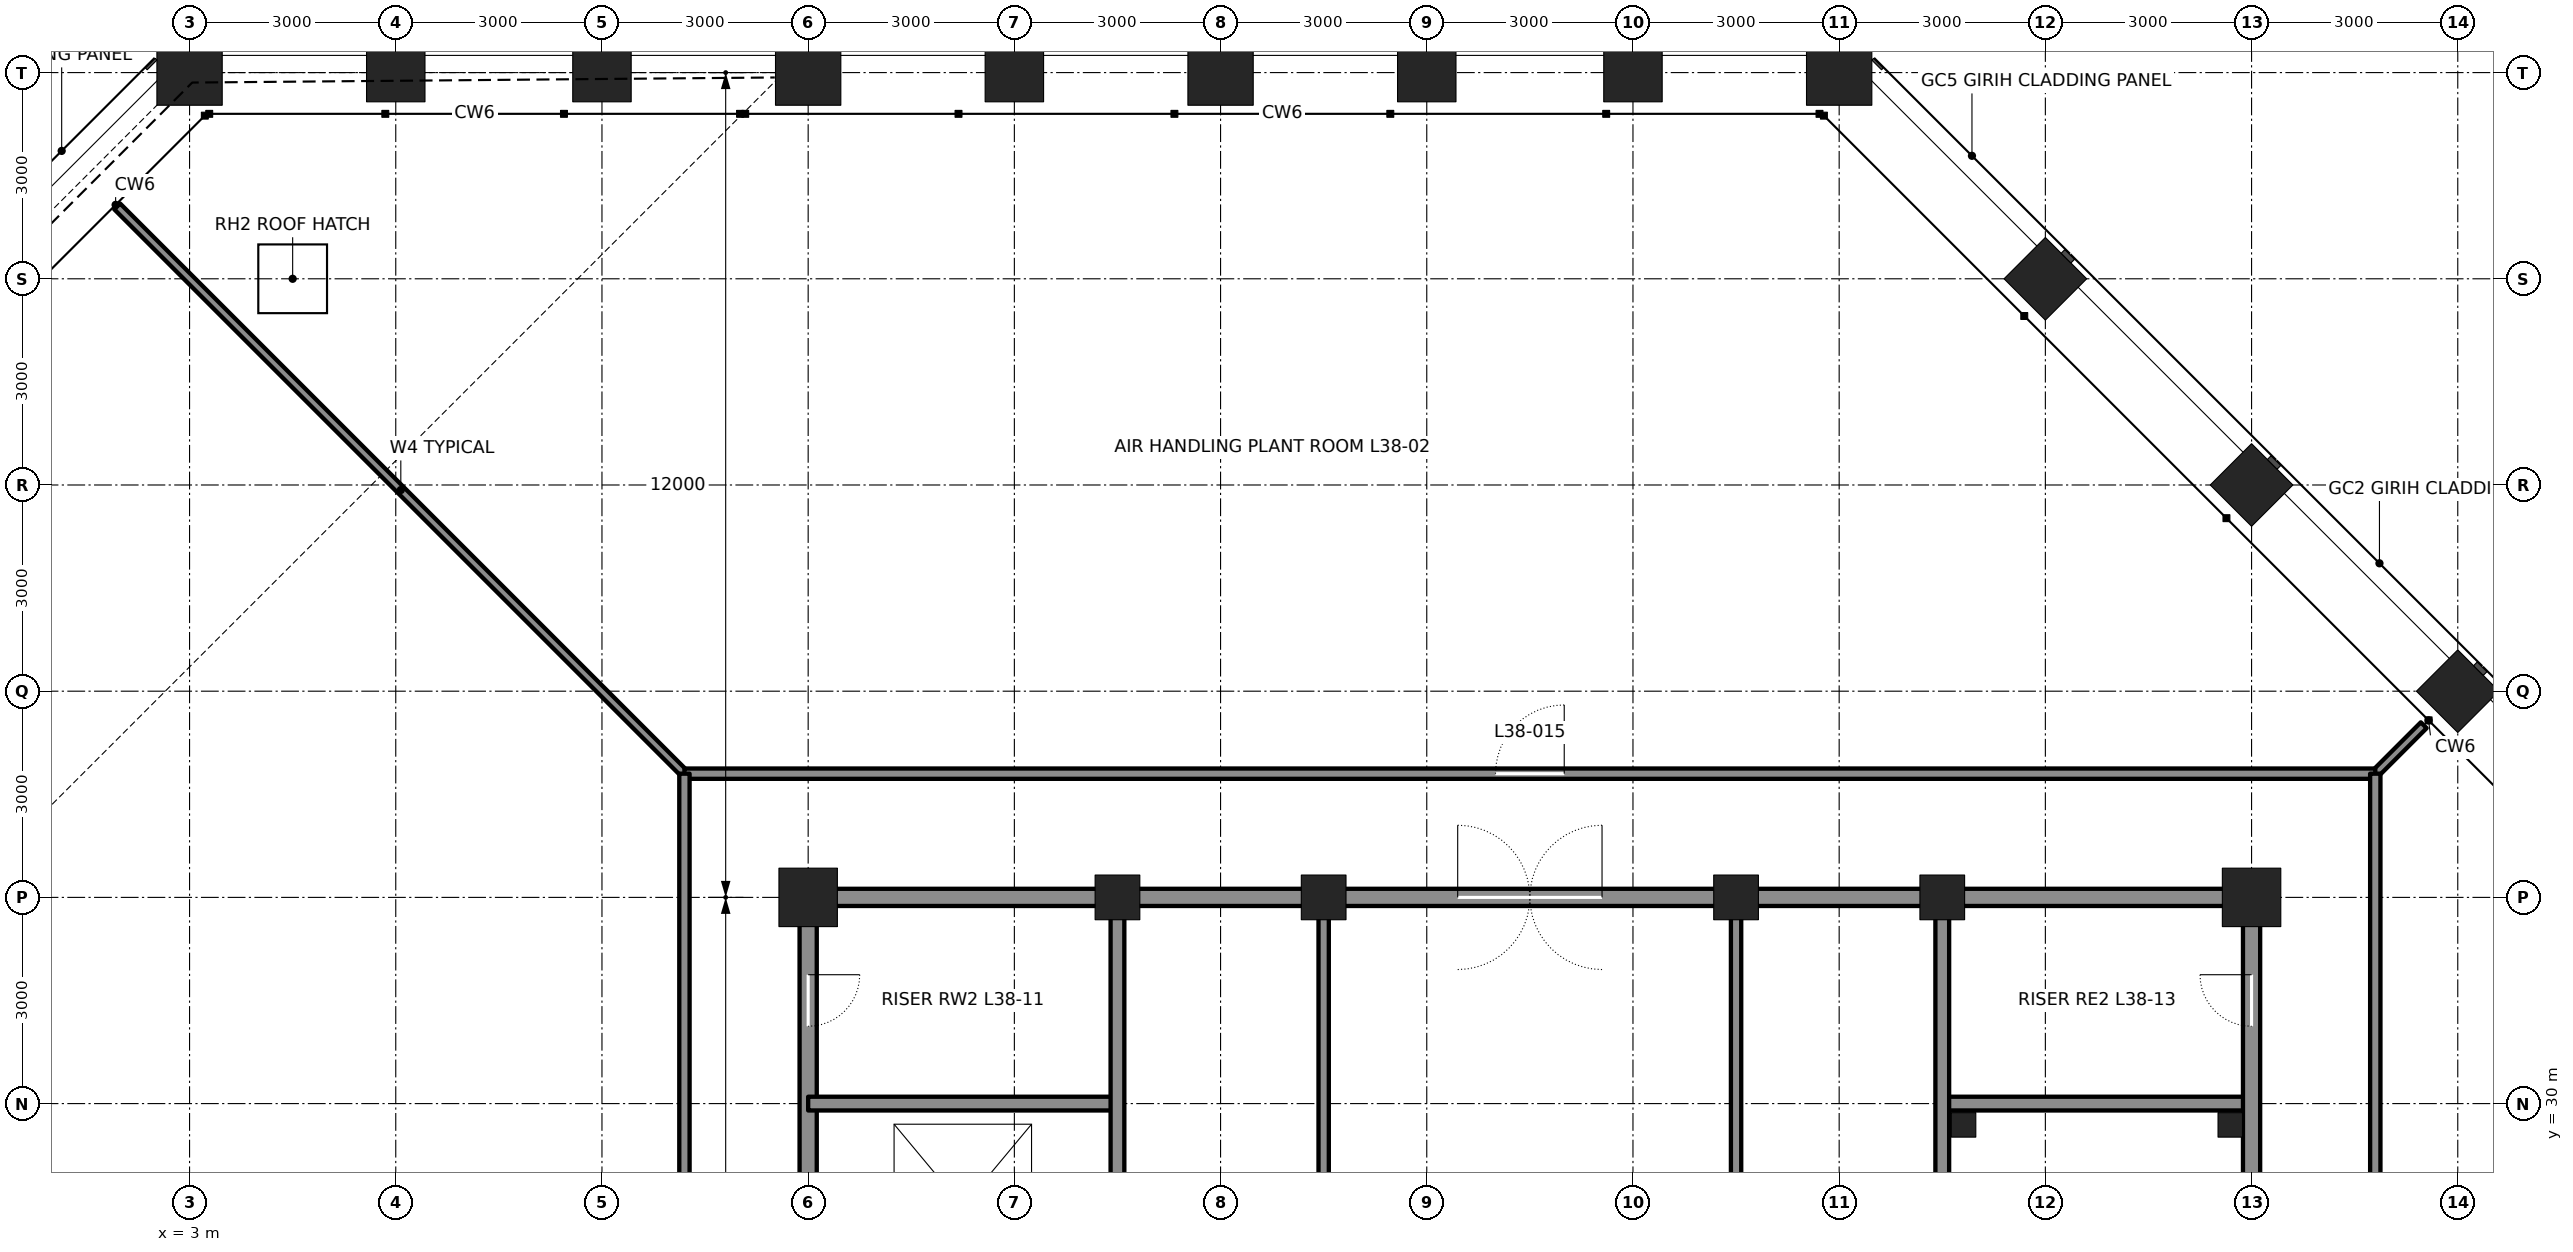
"""IFC4 building model, lengths in metres.
Left out: names, types, materials, properties, quantities, classifications, styles, units other than length and angle.
Written with IfcOpenShell. Run it as: python <this file> out.ifc"""

import sys

from ifc_helpers import new_model, si_unit, direction, frame, frame_2d, origin, origin_2d, place, context, subcontext, project, spatial, rectangle, hollow_rectangle, extrude, element, fill, save


model = new_model("IFC4")
c1 = context("Model", 3, precision=1e-05, world=origin(), true_north=direction((0.0, 1.0)))
c2 = subcontext(c1, "Body", "Model", "MODEL_VIEW")
j1 = project(units=[si_unit("LENGTHUNIT", "METRE"), si_unit("PLANEANGLEUNIT", "RADIAN")], contexts=[c1])
p1 = place(None, origin())
s1 = spatial("IfcSite", under=j1, at=p1, CompositionType="ELEMENT")
p2 = place(p1, origin())
s2 = spatial("IfcBuilding", under=s1, at=p2, CompositionType="ELEMENT")
p3 = place(p2, frame((0.0, 0.0, 174.0)))
s3 = spatial("IfcBuildingStorey", under=s2, at=p3, CompositionType="ELEMENT", Elevation=174.0)
for number, where, z_axis, x_axis in (
    (1, (36.0, 36.0, 0.0), (0.0, 0.0, 1.0), (0.707, 0.707, 0.0)),
    (2, (33.0, 39.0, 0.0), (0.0, 0.0, 1.0), (0.707, 0.707, 0.0)),
    (3, (30.0, 42.0, 0.0), (0.0, 0.0, 1.0), (0.707, 0.707, 0.0)),
):
    element("IfcColumn", number, at=place(p3, frame(where, z_axis=z_axis, x_axis=x_axis)), inside=s3, PredefinedType="COLUMN", context=c2, shape_type="SweptSolid", body=[
        extrude(hollow_rectangle(XDim=0.85, YDim=0.85, WallThickness=0.085, at=origin_2d()), origin(), (0.0, 0.0, 1.0), 6.0),
    ])
p4 = place(p3, frame((27.0, 45.0, 0.0), z_axis=(0.0, 0.0, 1.0), x_axis=(0.0, 1.0, 0.0)))
e4 = element("IfcColumn", 4, at=p4, inside=s3, PredefinedType="COLUMN", context=c2, shape_type="SweptSolid", body=[
    extrude(hollow_rectangle(XDim=0.95, YDim=0.95, WallThickness=0.095, at=origin_2d()), origin(), (0.0, 0.0, 1.0), 6.0),
])
for number, where, z_axis, x_axis in (
    (5, (24.0, 45.0, 0.0), (0.0, 0.0, 1.0), (0.0, 1.0, 0.0)),
    (6, (21.0, 45.0, 0.0), (0.0, 0.0, 1.0), (0.0, 1.0, 0.0)),
):
    element("IfcColumn", number, at=place(p3, frame(where, z_axis=z_axis, x_axis=x_axis)), inside=s3, PredefinedType="COLUMN", context=c2, shape_type="SweptSolid", body=[
        extrude(hollow_rectangle(XDim=0.85, YDim=0.85, WallThickness=0.085, at=origin_2d()), origin(), (0.0, 0.0, 1.0), 6.0),
    ])
p5 = place(p3, frame((18.0, 45.0, 0.0), z_axis=(0.0, 0.0, 1.0), x_axis=(0.0, 1.0, 0.0)))
e7 = element("IfcColumn", 7, at=p5, inside=s3, PredefinedType="COLUMN", context=c2, shape_type="SweptSolid", body=[
    extrude(hollow_rectangle(XDim=0.95, YDim=0.95, WallThickness=0.11, at=origin_2d()), origin(), (0.0, 0.0, 1.0), 6.0),
])
p6 = place(p3, frame((15.0, 45.0, 0.0), z_axis=(0.0, 0.0, 1.0), x_axis=(0.0, 1.0, 0.0)))
e8 = element("IfcColumn", 8, at=p6, inside=s3, PredefinedType="COLUMN", context=c2, shape_type="SweptSolid", body=[
    extrude(hollow_rectangle(XDim=0.85, YDim=0.85, WallThickness=0.085, at=origin_2d()), origin(), (0.0, 0.0, 1.0), 6.0),
])
p7 = place(p3, frame((12.0, 45.0, 0.0), z_axis=(0.0, 0.0, 1.0), x_axis=(0.0, 1.0, 0.0)))
e9 = element("IfcColumn", 9, at=p7, inside=s3, PredefinedType="COLUMN", context=c2, shape_type="SweptSolid", body=[
    extrude(hollow_rectangle(XDim=0.95, YDim=0.95, WallThickness=0.11, at=origin_2d()), origin(), (0.0, 0.0, 1.0), 6.0),
])
p8 = place(p3, frame((9.0, 45.0, 0.0), z_axis=(0.0, 0.0, 1.0), x_axis=(0.0, 1.0, 0.0)))
e10 = element("IfcColumn", 10, at=p8, inside=s3, PredefinedType="COLUMN", context=c2, shape_type="SweptSolid", body=[
    extrude(hollow_rectangle(XDim=0.85, YDim=0.85, WallThickness=0.085, at=origin_2d()), origin(), (0.0, 0.0, 1.0), 4.149),
])
p9 = place(p3, frame((6.0, 45.0, 0.0), z_axis=(0.0, 0.0, 1.0), x_axis=(0.0, 1.0, 0.0)))
e11 = element("IfcColumn", 11, at=p9, inside=s3, PredefinedType="COLUMN", context=c2, shape_type="SweptSolid", body=[
    extrude(hollow_rectangle(XDim=0.85, YDim=0.85, WallThickness=0.085, at=origin_2d()), origin(), (0.0, 0.0, 1.0), 3.698),
])
p10 = place(p3, frame((3.0, 45.0, 0.0), z_axis=(0.0, 0.0, 1.0), x_axis=(0.0, 1.0, 0.0)))
e12 = element("IfcColumn", 12, at=p10, inside=s3, PredefinedType="COLUMN", context=c2, shape_type="SweptSolid", body=[
    extrude(hollow_rectangle(XDim=0.95, YDim=0.95, WallThickness=0.095, at=origin_2d()), origin(), (0.0, 0.0, 1.0), 3.247),
])
p11 = place(p3, frame((12.0, 33.0, 0.0), z_axis=(0.0, 0.0, 1.0), x_axis=(1.0, 0.0, 0.0)))
e13 = element("IfcColumn", 13, at=p11, inside=s3, PredefinedType="COLUMN", context=c2, shape_type="SweptSolid", body=[
    extrude(hollow_rectangle(XDim=0.85, YDim=0.85, WallThickness=0.085, at=origin_2d()), origin(), (0.0, 0.0, 1.0), 6.0),
])
for number, where, z_axis, x_axis in (
    (14, (16.5, 33.0, 0.0), (0.0, 0.0, 1.0), (1.0, 0.0, 0.0)),
    (15, (19.5, 33.0, 0.0), (0.0, 0.0, 1.0), (1.0, 0.0, 0.0)),
    (16, (25.5, 33.0, 0.0), (0.0, 0.0, 1.0), (1.0, 0.0, 0.0)),
    (17, (28.5, 33.0, 0.0), (0.0, 0.0, 1.0), (1.0, 0.0, 0.0)),
):
    element("IfcColumn", number, at=place(p3, frame(where, z_axis=z_axis, x_axis=x_axis)), inside=s3, PredefinedType="COLUMN", context=c2, shape_type="SweptSolid", body=[
        extrude(hollow_rectangle(XDim=0.65, YDim=0.65, WallThickness=0.065, at=origin_2d()), origin(), (0.0, 0.0, 1.0), 6.0),
    ])
p12 = place(p3, frame((33.0, 33.0, 0.0), z_axis=(0.0, 0.0, 1.0), x_axis=(1.0, 0.0, 0.0)))
e18 = element("IfcColumn", 18, at=p12, inside=s3, PredefinedType="COLUMN", context=c2, shape_type="SweptSolid", body=[
    extrude(hollow_rectangle(XDim=0.85, YDim=0.85, WallThickness=0.085, at=origin_2d()), origin(), (0.0, 0.0, 1.0), 6.0),
])
p13 = place(p3, frame((12.0, 24.25, 0.0), z_axis=(0.0, 0.0, 1.0), x_axis=(0.0, 1.0, 0.0)))
e19 = element("IfcWall", 19, at=p13, inside=s3, PredefinedType="SOLIDWALL", context=c2, shape_type="SweptSolid", body=[
    extrude(rectangle(XDim=8.5, YDim=0.25, at=frame_2d((4.25, 0.0))), origin(), (0.0, 0.0, 1.0), 4.913),
])
p14 = place(p13, frame((0.65, 0.0, 0.0)))
e20 = element("IfcOpeningElement", 20, at=p14, cuts=e19, PredefinedType="OPENING", context=c2, shape_type="SweptSolid", body=[
    extrude(rectangle(XDim=1.2, YDim=2.1, at=frame_2d((0.6, 1.05))), frame((0.0, 0.135, 0.0), z_axis=(0.0, -1.0, 0.0), x_axis=(1.0, 0.0, 0.0)), (0.0, 0.0, 1.0), 0.27),
])
p15 = place(p13, frame((6.875, 0.0, 0.0)))
e21 = element("IfcOpeningElement", 21, at=p15, cuts=e19, PredefinedType="OPENING", context=c2, shape_type="SweptSolid", body=[
    extrude(rectangle(XDim=0.75, YDim=2.1, at=frame_2d((0.375, 1.05))), frame((0.0, 0.135, 0.0), z_axis=(0.0, -1.0, 0.0), x_axis=(1.0, 0.0, 0.0)), (0.0, 0.0, 1.0), 0.27),
])
for number, where, z_axis, x_axis in (
    (22, (12.0, 30.0, 0.0), (0.0, 0.0, 1.0), (1.0, 0.0, 0.0)),
    (23, (28.5, 30.0, 0.0), (0.0, 0.0, 1.0), (1.0, 0.0, 0.0)),
):
    element("IfcWall", number, at=place(p3, frame(where, z_axis=z_axis, x_axis=x_axis)), inside=s3, PredefinedType="SOLIDWALL", context=c2, shape_type="SweptSolid", body=[
        extrude(rectangle(XDim=4.5, YDim=0.2, at=frame_2d((2.25, 0.0))), origin(), (0.0, 0.0, 1.0), 5.84),
    ])
p16 = place(p3, frame((12.25, 33.0, 0.0), z_axis=(0.0, 0.0, 1.0), x_axis=(1.0, 0.0, 0.0)))
e24 = element("IfcWall", 24, at=p16, inside=s3, PredefinedType="SOLIDWALL", context=c2, shape_type="SweptSolid", body=[
    extrude(rectangle(XDim=4.0, YDim=0.25, at=frame_2d((2.0, 0.0))), origin(), (0.0, 0.0, 1.0), 4.981),
])
for number, where, z_axis, x_axis in (
    (25, (16.75, 33.0, 0.0), (0.0, 0.0, 1.0), (1.0, 0.0, 0.0)),
    (26, (25.75, 33.0, 0.0), (0.0, 0.0, 1.0), (1.0, 0.0, 0.0)),
):
    element("IfcWall", number, at=place(p3, frame(where, z_axis=z_axis, x_axis=x_axis)), inside=s3, PredefinedType="SOLIDWALL", context=c2, shape_type="SweptSolid", body=[
        extrude(rectangle(XDim=2.5, YDim=0.25, at=frame_2d((1.25, 0.0))), origin(), (0.0, 0.0, 1.0), 4.981),
    ])
p17 = place(p3, frame((28.75, 33.0, 0.0), z_axis=(0.0, 0.0, 1.0), x_axis=(1.0, 0.0, 0.0)))
e27 = element("IfcWall", 27, at=p17, inside=s3, PredefinedType="SOLIDWALL", context=c2, shape_type="SweptSolid", body=[
    extrude(rectangle(XDim=4.0, YDim=0.25, at=frame_2d((2.0, 0.0))), origin(), (0.0, 0.0, 1.0), 4.981),
])
p18 = place(p3, frame((16.5, 24.25, 0.0), z_axis=(0.0, 0.0, 1.0), x_axis=(0.0, 1.0, 0.0)))
e28 = element("IfcWall", 28, at=p18, inside=s3, PredefinedType="SOLIDWALL", context=c2, shape_type="SweptSolid", body=[
    extrude(rectangle(XDim=8.5, YDim=0.2, at=frame_2d((4.25, 0.0))), origin(), (0.0, 0.0, 1.0), 4.913),
])
for number, where, z_axis, x_axis in (
    (29, (19.5, 27.0, 0.0), (0.0, 0.0, 1.0), (0.0, 1.0, 0.0)),
    (30, (25.5, 27.0, 0.0), (0.0, 0.0, 1.0), (0.0, 1.0, 0.0)),
):
    element("IfcWall", number, at=place(p3, frame(where, z_axis=z_axis, x_axis=x_axis)), inside=s3, PredefinedType="PARTITIONING", context=c2, shape_type="SweptSolid", body=[
        extrude(rectangle(XDim=5.75, YDim=0.15, at=frame_2d((2.875, 0.0))), origin(), (0.0, 0.0, 1.0), 4.865),
    ])
p19 = place(p3, frame((28.5, 24.25, 0.0), z_axis=(0.0, 0.0, 1.0), x_axis=(0.0, 1.0, 0.0)))
e31 = element("IfcWall", 31, at=p19, inside=s3, PredefinedType="SOLIDWALL", context=c2, shape_type="SweptSolid", body=[
    extrude(rectangle(XDim=8.5, YDim=0.2, at=frame_2d((4.25, 0.0))), origin(), (0.0, 0.0, 1.0), 4.913),
])
p20 = place(p3, frame((33.0, 24.25, 0.0), z_axis=(0.0, 0.0, 1.0), x_axis=(0.0, 1.0, 0.0)))
e32 = element("IfcWall", 32, at=p20, inside=s3, PredefinedType="SOLIDWALL", context=c2, shape_type="SweptSolid", body=[
    extrude(rectangle(XDim=8.5, YDim=0.25, at=frame_2d((4.25, 0.0))), origin(), (0.0, 0.0, 1.0), 4.913),
])
p21 = place(p20, frame((6.875, 0.0, 0.0)))
e33 = element("IfcOpeningElement", 33, at=p21, cuts=e32, PredefinedType="OPENING", context=c2, shape_type="SweptSolid", body=[
    extrude(rectangle(XDim=0.75, YDim=2.1, at=frame_2d((0.375, 1.05))), frame((0.0, 0.135, 0.0), z_axis=(0.0, -1.0, 0.0), x_axis=(1.0, 0.0, 0.0)), (0.0, 0.0, 1.0), 0.27),
])
p22 = place(p3, frame((19.5, 33.0, 0.0), z_axis=(0.0, 0.0, 1.0), x_axis=(1.0, 0.0, 0.0)))
e34 = element("IfcWall", 34, at=p22, inside=s3, PredefinedType="SOLIDWALL", context=c2, shape_type="SweptSolid", body=[
    extrude(rectangle(XDim=6.0, YDim=0.25, at=frame_2d((3.0, 0.0))), origin(), (0.0, 0.0, 1.0), 4.981),
])
p23 = place(p22, frame((1.95, 0.0, 0.0)))
e35 = element("IfcOpeningElement", 35, at=p23, cuts=e34, PredefinedType="OPENING", context=c2, shape_type="SweptSolid", body=[
    extrude(rectangle(XDim=2.1, YDim=2.4, at=frame_2d((1.05, 1.2))), frame((0.0, 0.135, 0.0), z_axis=(0.0, -1.0, 0.0), x_axis=(1.0, 0.0, 0.0)), (0.0, 0.0, 1.0), 0.27),
])
p24 = place(p3, frame((34.8, 34.8, 0.0), z_axis=(0.0, 0.0, 1.0), x_axis=(0.707106781187, 0.707106781187, 0.0)))
e36 = element("IfcWall", 36, at=p24, inside=s3, PredefinedType="PARTITIONING", context=c2, shape_type="SweptSolid", body=[
    extrude(rectangle(XDim=0.997, YDim=0.12, at=frame_2d((0.499, 0.0))), origin(), (0.0, 0.0, 1.0), 5.84),
])
p25 = place(p3, frame((10.2, 34.8, 0.0), z_axis=(0.0, 0.0, 1.0), x_axis=(-0.707106781187, 0.707106781187, 0.0)))
e37 = element("IfcWall", 37, at=p25, inside=s3, PredefinedType="PARTITIONING", context=c2, shape_type="SweptSolid", body=[
    extrude(rectangle(XDim=11.671, YDim=0.12, at=frame_2d((5.836, 0.0))), origin(), (0.0, 0.0, 1.0), 5.84),
])
p26 = place(p3, frame((10.2, 34.8, 0.0), z_axis=(0.0, 0.0, 1.0), x_axis=(1.0, 0.0, 0.0)))
e38 = element("IfcWall", 38, at=p26, inside=s3, PredefinedType="PARTITIONING", context=c2, shape_type="SweptSolid", body=[
    extrude(rectangle(XDim=24.6, YDim=0.15, at=frame_2d((12.3, 0.0))), origin(), (0.0, 0.0, 1.0), 5.84),
])
p27 = place(p26, frame((11.8, 0.0, 0.0)))
e39 = element("IfcOpeningElement", 39, at=p27, cuts=e38, PredefinedType="OPENING", context=c2, shape_type="SweptSolid", body=[
    extrude(rectangle(XDim=1.0, YDim=2.4, at=frame_2d((0.5, 1.2))), frame((0.0, 0.085, 0.0), z_axis=(0.0, -1.0, 0.0), x_axis=(1.0, 0.0, 0.0)), (0.0, 0.0, 1.0), 0.17),
])
p28 = place(p3, frame((10.2, 10.2, 0.0), z_axis=(0.0, 0.0, 1.0), x_axis=(0.0, 1.0, 0.0)))
e40 = element("IfcWall", 40, at=p28, inside=s3, PredefinedType="PARTITIONING", context=c2, shape_type="SweptSolid", body=[
    extrude(rectangle(XDim=24.6, YDim=0.15, at=frame_2d((12.3, 0.0))), origin(), (0.0, 0.0, 1.0), 5.84),
])
p29 = place(p28, frame((11.8, 0.0, 0.0)))
e41 = element("IfcOpeningElement", 41, at=p29, cuts=e40, PredefinedType="OPENING", context=c2, shape_type="SweptSolid", body=[
    extrude(rectangle(XDim=1.0, YDim=2.4, at=frame_2d((0.5, 1.2))), frame((0.0, 0.085, 0.0), z_axis=(0.0, -1.0, 0.0), x_axis=(1.0, 0.0, 0.0)), (0.0, 0.0, 1.0), 0.17),
])
p30 = place(p3, frame((34.8, 10.2, 0.0), z_axis=(0.0, 0.0, 1.0), x_axis=(0.0, 1.0, 0.0)))
e42 = element("IfcWall", 42, at=p30, inside=s3, PredefinedType="PARTITIONING", context=c2, shape_type="SweptSolid", body=[
    extrude(rectangle(XDim=24.6, YDim=0.15, at=frame_2d((12.3, 0.0))), origin(), (0.0, 0.0, 1.0), 5.84),
])
p31 = place(p30, frame((11.8, 0.0, 0.0)))
e43 = element("IfcOpeningElement", 43, at=p31, cuts=e42, PredefinedType="OPENING", context=c2, shape_type="SweptSolid", body=[
    extrude(rectangle(XDim=1.0, YDim=2.4, at=frame_2d((0.5, 1.2))), frame((0.0, 0.085, 0.0), z_axis=(0.0, -1.0, 0.0), x_axis=(1.0, 0.0, 0.0)), (0.0, 0.0, 1.0), 0.17),
])
for number, where, z_axis, x_axis in (
    (44, (28.81, 29.69, 0.0), (0.0, 0.0, 1.0), (1.0, 0.0, 0.0)),
    (45, (32.69, 29.69, 0.0), (0.0, 0.0, 1.0), (1.0, 0.0, 0.0)),
):
    element("IfcColumn", number, at=place(p3, frame(where, z_axis=z_axis, x_axis=x_axis)), inside=s3, PredefinedType="COLUMN", context=c2, shape_type="SweptSolid", body=[
        extrude(hollow_rectangle(XDim=0.356, YDim=0.356, WallThickness=0.015, at=origin_2d()), origin(), (0.0, 0.0, 1.0), 6.0),
    ])
p32 = place(p3, frame((4.5, 42.0, 4.819)))
p33 = place(p32, frame((0.0, 0.0, 0.454)))
e46 = element("IfcDoor", 46, at=p33, inside=s3, OperationType="SINGLE_SWING_LEFT", PredefinedType="TRAPDOOR", context=c2, shape_type="SweptSolid", body=[
    extrude(rectangle(XDim=1.0, YDim=1.0, at=origin_2d()), origin(), (0.0, 0.0, 1.0), 0.05),
])
p34 = place(p23, origin())
e47 = element("IfcDoor", 47, at=p34, inside=s3, OperationType="DOUBLE_DOOR_DOUBLE_SWING", PredefinedType="DOOR", context=c2, shape_type="SweptSolid", body=[
    extrude(rectangle(XDim=2.1, YDim=2.4, at=frame_2d((1.05, 1.2))), frame((0.0, 0.025, 0.0), z_axis=(0.0, -1.0, 0.0), x_axis=(1.0, 0.0, 0.0)), (0.0, 0.0, 1.0), 0.05),
])
fill(e35, e47)
p35 = place(p15, frame((0.75, 0.0, 0.0), z_axis=(0.0, 0.0, 1.0), x_axis=(-1.0, 0.0, 0.0)))
e48 = element("IfcDoor", 48, at=p35, inside=s3, OperationType="SINGLE_SWING_LEFT", PredefinedType="DOOR", context=c2, shape_type="SweptSolid", body=[
    extrude(rectangle(XDim=0.75, YDim=2.1, at=frame_2d((0.375, 1.05))), frame((0.0, 0.025, 0.0), z_axis=(0.0, -1.0, 0.0), x_axis=(1.0, 0.0, 0.0)), (0.0, 0.0, 1.0), 0.05),
])
fill(e21, e48)
p36 = place(p21, origin())
e49 = element("IfcDoor", 49, at=p36, inside=s3, OperationType="SINGLE_SWING_RIGHT", PredefinedType="DOOR", context=c2, shape_type="SweptSolid", body=[
    extrude(rectangle(XDim=0.75, YDim=2.1, at=frame_2d((0.375, 1.05))), frame((0.0, 0.025, 0.0), z_axis=(0.0, -1.0, 0.0), x_axis=(1.0, 0.0, 0.0)), (0.0, 0.0, 1.0), 0.05),
])
fill(e33, e49)
p37 = place(p27, origin())
e50 = element("IfcDoor", 50, at=p37, inside=s3, OperationType="SINGLE_SWING_RIGHT", PredefinedType="DOOR", context=c2, shape_type="SweptSolid", body=[
    extrude(rectangle(XDim=1.0, YDim=2.4, at=frame_2d((0.5, 1.2))), frame((0.0, 0.025, 0.0), z_axis=(0.0, -1.0, 0.0), x_axis=(1.0, 0.0, 0.0)), (0.0, 0.0, 1.0), 0.05),
])
fill(e39, e50)
save(model, sys.argv[1])
